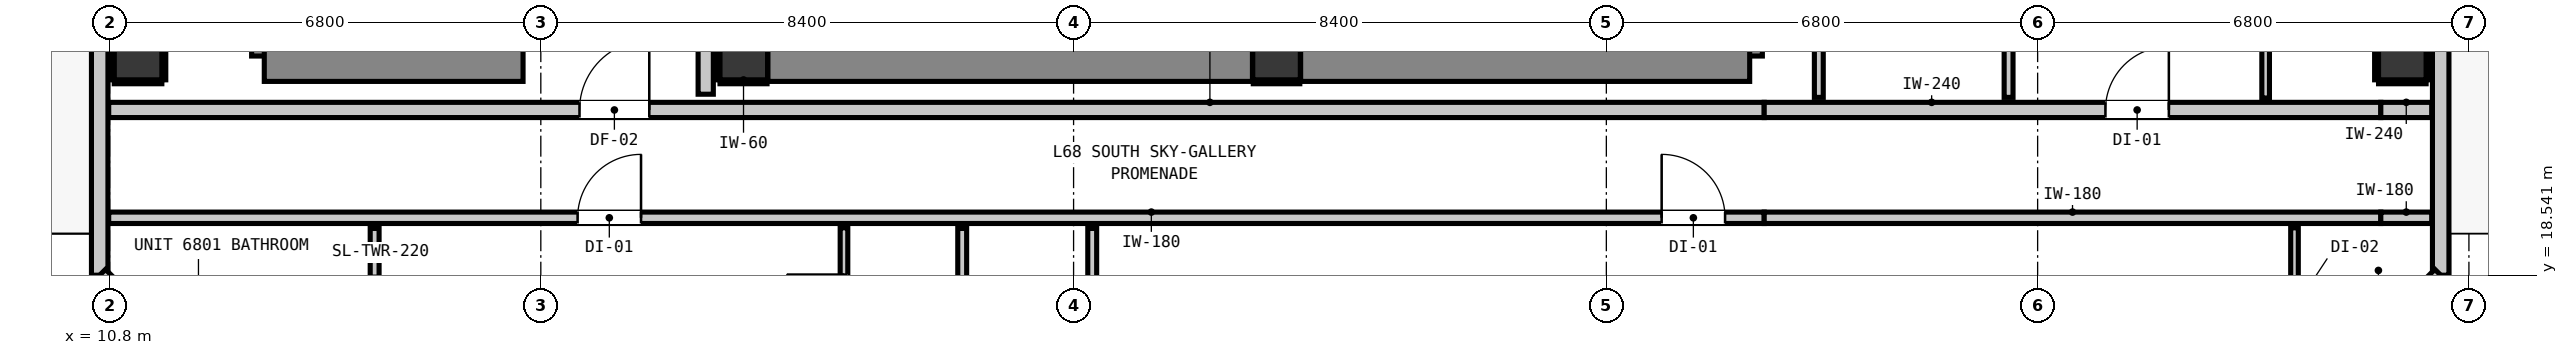
"""IFC4 building model, lengths in metres.
Left out: names, types, materials, properties, quantities, classifications, styles, units other than length and angle.
Written with IfcOpenShell. Run it as: python <this file> out.ifc"""

import sys

from ifc_helpers import new_model, si_unit, direction, frame, frame_2d, origin, origin_2d, place, context, subcontext, project, spatial, rectangle, extrude, element, fill, save


model = new_model("IFC4")
c1 = context("Model", 3, precision=1e-05, world=origin(), true_north=direction((0.0, 1.0)))
c2 = subcontext(c1, "Body", "Model", "MODEL_VIEW")
j1 = project(units=[si_unit("LENGTHUNIT", "METRE"), si_unit("PLANEANGLEUNIT", "RADIAN")], contexts=[c1])
p1 = place(None, origin())
s1 = spatial("IfcSite", under=j1, at=p1, CompositionType="ELEMENT")
p2 = place(p1, origin())
s2 = spatial("IfcBuilding", under=s1, at=p2, CompositionType="ELEMENT")
p3 = place(p2, frame((0.0, 0.0, 234.6)))
s3 = spatial("IfcBuildingStorey", under=s2, at=p3, CompositionType="ELEMENT", Elevation=234.6)
for number, where, z_axis, x_axis in (
    (1, (20.8, 22.0, 0.0), (0.0, 0.0, 1.0), (1.0, 0.0, 0.0)),
    (2, (29.2, 22.0, 0.0), (0.0, 0.0, 1.0), (1.0, 0.0, 0.0)),
):
    element("IfcColumn", number, at=place(p3, frame(where, z_axis=z_axis, x_axis=x_axis)), inside=s3, PredefinedType="COLUMN", context=c2, shape_type="SweptSolid", body=[
        extrude(rectangle(XDim=0.75, YDim=0.75, at=origin_2d()), origin(), (0.0, 0.0, 1.0), 3.32),
    ])
p4 = place(p3, frame((13.44, 22.0, 0.0), z_axis=(0.0, 0.0, 1.0), x_axis=(0.0, 1.0, 0.0)))
e3 = element("IfcWall", 3, at=p4, inside=s3, PredefinedType="SHEAR", context=c2, shape_type="SweptSolid", body=[
    extrude(rectangle(XDim=8.32, YDim=0.8, at=frame_2d((4.16, 0.0))), origin(), (0.0, 0.0, 1.0), 3.32),
])
p5 = place(p3, frame((13.24, 22.0, 0.0), z_axis=(0.0, 0.0, 1.0), x_axis=(1.0, 0.0, 0.0)))
e4 = element("IfcWall", 4, at=p5, inside=s3, PredefinedType="SHEAR", context=c2, shape_type="SweptSolid", body=[
    extrude(rectangle(XDim=4.08, YDim=0.8, at=frame_2d((2.04, 0.0))), origin(), (0.0, 0.0, 1.0), 3.32),
])
p6 = place(p3, frame((36.46, 22.0, 0.0), z_axis=(0.0, 0.0, 1.0), x_axis=(0.0, 1.0, 0.0)))
e5 = element("IfcWall", 5, at=p6, inside=s3, PredefinedType="SHEAR", context=c2, shape_type="SweptSolid", body=[
    extrude(rectangle(XDim=8.32, YDim=0.8, at=frame_2d((4.16, 0.0))), origin(), (0.0, 0.0, 1.0), 3.32),
])
p7 = place(p3, frame((29.58, 22.0, 0.0), z_axis=(0.0, 0.0, 1.0), x_axis=(1.0, 0.0, 0.0)))
e6 = element("IfcWall", 6, at=p7, inside=s3, PredefinedType="SHEAR", context=c2, shape_type="SweptSolid", body=[
    extrude(rectangle(XDim=7.08, YDim=0.8, at=frame_2d((3.54, 0.0))), origin(), (0.0, 0.0, 1.0), 3.32),
])
p8 = place(p3, frame((21.18, 22.0, 0.0), z_axis=(0.0, 0.0, 1.0), x_axis=(1.0, 0.0, 0.0)))
e7 = element("IfcWall", 7, at=p8, inside=s3, PredefinedType="SHEAR", context=c2, shape_type="SweptSolid", body=[
    extrude(rectangle(XDim=7.64, YDim=0.8, at=frame_2d((3.82, 0.0))), origin(), (0.0, 0.0, 1.0), 3.32),
])
for number, where, z_axis, x_axis in (
    (8, (11.25, 22.0, 0.0), (0.0, 0.0, 1.0), (1.0, 0.0, 0.0)),
    (9, (46.95, 22.0, 0.0), (0.0, 0.0, 1.0), (1.0, 0.0, 0.0)),
):
    element("IfcColumn", number, at=place(p3, frame(where, z_axis=z_axis, x_axis=x_axis)), inside=s3, PredefinedType="COLUMN", context=c2, shape_type="SweptSolid", body=[
        extrude(rectangle(XDim=0.75, YDim=0.75, at=origin_2d()), origin(), (0.0, 0.0, 1.0), 3.32),
    ])
p9 = place(p3, frame((10.645, 18.545, 0.0), z_axis=(0.0, 0.0, 1.0), x_axis=(0.0, 1.0, 0.0)))
e10 = element("IfcWall", 10, at=p9, inside=s3, PredefinedType="STANDARD", context=c2, shape_type="SweptSolid", body=[
    extrude(rectangle(XDim=30.31, YDim=0.26, at=frame_2d((15.155, 0.0))), origin(), (0.0, 0.0, 1.0), 3.1),
])
p10 = place(p9, frame((27.695, 0.0, 0.0)))
e11 = element("IfcOpeningElement", 11, at=p10, cuts=e10, PredefinedType="OPENING", context=c2, shape_type="SweptSolid", body=[
    extrude(rectangle(XDim=1.0, YDim=2.15, at=frame_2d((0.5, 1.075))), frame((0.0, 0.14, 0.0), z_axis=(0.0, -1.0, 0.0), x_axis=(1.0, 0.0, 0.0)), (0.0, 0.0, 1.0), 0.28),
])
p11 = place(p9, frame((29.108, 0.0, 0.85)))
e12 = element("IfcOpeningElement", 12, at=p11, cuts=e10, PredefinedType="OPENING", context=c2, shape_type="SweptSolid", body=[
    extrude(rectangle(XDim=0.9, YDim=1.5, at=frame_2d((0.45, 0.75))), frame((0.0, 0.14, 0.0), z_axis=(0.0, -1.0, 0.0), x_axis=(1.0, 0.0, 0.0)), (0.0, 0.0, 1.0), 0.28),
])
p12 = place(p3, frame((47.555, 48.855, 0.0), z_axis=(0.0, 0.0, 1.0), x_axis=(0.0, -1.0, 0.0)))
e13 = element("IfcWall", 13, at=p12, inside=s3, PredefinedType="STANDARD", context=c2, shape_type="SweptSolid", body=[
    extrude(rectangle(XDim=30.31, YDim=0.26, at=frame_2d((15.155, 0.0))), origin(), (0.0, 0.0, 1.0), 3.1),
])
p13 = place(p12, frame((0.91, 0.0, 0.0)))
e14 = element("IfcOpeningElement", 14, at=p13, cuts=e13, PredefinedType="OPENING", context=c2, shape_type="SweptSolid", body=[
    extrude(rectangle(XDim=1.0, YDim=2.15, at=frame_2d((0.5, 1.075))), frame((0.0, 0.14, 0.0), z_axis=(0.0, -1.0, 0.0), x_axis=(1.0, 0.0, 0.0)), (0.0, 0.0, 1.0), 0.28),
])
p14 = place(p12, frame((3.782, 0.0, 0.85)))
e15 = element("IfcOpeningElement", 15, at=p14, cuts=e13, PredefinedType="OPENING", context=c2, shape_type="SweptSolid", body=[
    extrude(rectangle(XDim=1.35, YDim=1.85, at=frame_2d((0.675, 0.925))), frame((0.0, 0.14, 0.0), z_axis=(0.0, -1.0, 0.0), x_axis=(1.0, 0.0, 0.0)), (0.0, 0.0, 1.0), 0.28),
])
for number, where, z_axis, x_axis in (
    (16, (47.555, 18.545, 0.0), (0.0, 0.0, 1.0), (-0.707, -0.707, 0.0)),
    (17, (12.745, 16.445, 0.0), (0.0, 0.0, 1.0), (-0.707, 0.707, 0.0)),
):
    element("IfcWall", number, at=place(p3, frame(where, z_axis=z_axis, x_axis=x_axis)), inside=s3, PredefinedType="STANDARD", context=c2, shape_type="SweptSolid", body=[
        extrude(rectangle(XDim=2.97, YDim=0.26, at=frame_2d((1.485, 0.0))), origin(), (0.0, 0.0, 1.0), 3.1),
    ])
p15 = place(p3, frame((10.787, 21.15, 0.0), z_axis=(0.0, 0.0, 1.0), x_axis=(1.0, 0.0, 0.0)))
e18 = element("IfcWall", 18, at=p15, inside=s3, PredefinedType="PARTITIONING", context=c2, shape_type="SweptSolid", body=[
    extrude(rectangle(XDim=26.102, YDim=0.24, at=frame_2d((13.051, 0.0))), origin(), (0.0, 0.0, 1.0), 3.1),
])
p16 = place(p15, frame((7.423, 0.0, 0.0)))
e19 = element("IfcOpeningElement", 19, at=p16, cuts=e18, PredefinedType="OPENING", context=c2, shape_type="SweptSolid", body=[
    extrude(rectangle(XDim=1.1, YDim=2.15, at=frame_2d((0.55, 1.075))), frame((0.0, 0.13, 0.0), z_axis=(0.0, -1.0, 0.0), x_axis=(1.0, 0.0, 0.0)), (0.0, 0.0, 1.0), 0.26),
])
p17 = place(p3, frame((36.889, 21.15, 0.0), z_axis=(0.0, 0.0, 1.0), x_axis=(1.0, 0.0, 0.0)))
e20 = element("IfcWall", 20, at=p17, inside=s3, PredefinedType="PARTITIONING", context=c2, shape_type="SweptSolid", body=[
    extrude(rectangle(XDim=9.722, YDim=0.24, at=frame_2d((4.861, 0.0))), origin(), (0.0, 0.0, 1.0), 2.477),
])
p18 = place(p17, frame((5.38, 0.0, 0.0)))
e21 = element("IfcOpeningElement", 21, at=p18, cuts=e20, PredefinedType="OPENING", context=c2, shape_type="SweptSolid", body=[
    extrude(rectangle(XDim=1.0, YDim=2.15, at=frame_2d((0.5, 1.075))), frame((0.0, 0.13, 0.0), z_axis=(0.0, -1.0, 0.0), x_axis=(1.0, 0.0, 0.0)), (0.0, 0.0, 1.0), 0.26),
])
p19 = place(p3, frame((46.611, 21.15, 0.0), z_axis=(0.0, 0.0, 1.0), x_axis=(1.0, 0.0, 0.0)))
e22 = element("IfcWall", 22, at=p19, inside=s3, PredefinedType="PARTITIONING", context=c2, shape_type="SweptSolid", body=[
    extrude(rectangle(XDim=0.802, YDim=0.24, at=frame_2d((0.401, 0.0))), origin(), (0.0, 0.0, 1.0), 3.1),
])
p20 = place(p3, frame((10.787, 19.45, 0.0), z_axis=(0.0, 0.0, 1.0), x_axis=(1.0, 0.0, 0.0)))
e23 = element("IfcWall", 23, at=p20, inside=s3, PredefinedType="PARTITIONING", context=c2, shape_type="SweptSolid", body=[
    extrude(rectangle(XDim=26.102, YDim=0.18, at=frame_2d((13.051, 0.0))), origin(), (0.0, 0.0, 1.0), 3.1),
])
p21 = place(p20, frame((7.393, 0.0, 0.0)))
e24 = element("IfcOpeningElement", 24, at=p21, cuts=e23, PredefinedType="OPENING", context=c2, shape_type="SweptSolid", body=[
    extrude(rectangle(XDim=1.0, YDim=2.15, at=frame_2d((0.5, 1.075))), frame((0.0, 0.1, 0.0), z_axis=(0.0, -1.0, 0.0), x_axis=(1.0, 0.0, 0.0)), (0.0, 0.0, 1.0), 0.2),
])
p22 = place(p20, frame((24.485, 0.0, 0.0)))
e25 = element("IfcOpeningElement", 25, at=p22, cuts=e23, PredefinedType="OPENING", context=c2, shape_type="SweptSolid", body=[
    extrude(rectangle(XDim=1.0, YDim=2.15, at=frame_2d((0.5, 1.075))), frame((0.0, 0.1, 0.0), z_axis=(0.0, -1.0, 0.0), x_axis=(1.0, 0.0, 0.0)), (0.0, 0.0, 1.0), 0.2),
])
p23 = place(p3, frame((36.889, 19.45, 0.0), z_axis=(0.0, 0.0, 1.0), x_axis=(1.0, 0.0, 0.0)))
e26 = element("IfcWall", 26, at=p23, inside=s3, PredefinedType="PARTITIONING", context=c2, shape_type="SweptSolid", body=[
    extrude(rectangle(XDim=9.722, YDim=0.18, at=frame_2d((4.861, 0.0))), origin(), (0.0, 0.0, 1.0), 2.477),
])
p24 = place(p3, frame((46.611, 19.45, 0.0), z_axis=(0.0, 0.0, 1.0), x_axis=(1.0, 0.0, 0.0)))
e27 = element("IfcWall", 27, at=p24, inside=s3, PredefinedType="PARTITIONING", context=c2, shape_type="SweptSolid", body=[
    extrude(rectangle(XDim=0.802, YDim=0.18, at=frame_2d((0.401, 0.0))), origin(), (0.0, 0.0, 1.0), 3.1),
])
p25 = place(p3, frame((20.2, 21.398, 0.0), z_axis=(0.0, 0.0, 1.0), x_axis=(0.0, 1.0, 0.0)))
e28 = element("IfcWall", 28, at=p25, inside=s3, PredefinedType="PARTITIONING", context=c2, shape_type="SweptSolid", body=[
    extrude(rectangle(XDim=6.754, YDim=0.24, at=frame_2d((3.377, 0.0))), origin(), (0.0, 0.0, 1.0), 3.1),
])
p26 = place(p3, frame((14.98, 16.587, 0.0), z_axis=(0.0, 0.0, 1.0), x_axis=(0.0, 1.0, 0.0)))
e29 = element("IfcWall", 29, at=p26, inside=s3, PredefinedType="PARTITIONING", context=c2, shape_type="SweptSolid", body=[
    extrude(rectangle(XDim=2.695, YDim=0.14, at=frame_2d((1.348, 0.0))), origin(), (0.0, 0.0, 1.0), 3.1),
])
p27 = place(p26, frame((1.088, 0.0, 0.0)))
e30 = element("IfcOpeningElement", 30, at=p27, cuts=e29, PredefinedType="OPENING", context=c2, shape_type="SweptSolid", body=[
    extrude(rectangle(XDim=0.86, YDim=2.02, at=frame_2d((0.43, 1.01))), frame((0.0, 0.08, 0.0), z_axis=(0.0, -1.0, 0.0), x_axis=(1.0, 0.0, 0.0)), (0.0, 0.0, 1.0), 0.16),
])
p28 = place(p3, frame((24.244, 16.587, 0.0), z_axis=(0.0, 0.0, 1.0), x_axis=(0.0, 1.0, 0.0)))
e31 = element("IfcWall", 31, at=p28, inside=s3, PredefinedType="PARTITIONING", context=c2, shape_type="SweptSolid", body=[
    extrude(rectangle(XDim=2.695, YDim=0.14, at=frame_2d((1.348, 0.0))), origin(), (0.0, 0.0, 1.0), 3.1),
])
p29 = place(p3, frame((26.294, 16.587, 0.0), z_axis=(0.0, 0.0, 1.0), x_axis=(0.0, 1.0, 0.0)))
e32 = element("IfcWall", 32, at=p29, inside=s3, PredefinedType="PARTITIONING", context=c2, shape_type="SweptSolid", body=[
    extrude(rectangle(XDim=2.695, YDim=0.14, at=frame_2d((1.348, 0.0))), origin(), (0.0, 0.0, 1.0), 3.1),
])
p30 = place(p29, frame((1.008, 0.0, 0.0)))
e33 = element("IfcOpeningElement", 33, at=p30, cuts=e32, PredefinedType="OPENING", context=c2, shape_type="SweptSolid", body=[
    extrude(rectangle(XDim=0.86, YDim=2.02, at=frame_2d((0.43, 1.01))), frame((0.0, 0.08, 0.0), z_axis=(0.0, -1.0, 0.0), x_axis=(1.0, 0.0, 0.0)), (0.0, 0.0, 1.0), 0.16),
])
p31 = place(p3, frame((37.75, 21.348, 0.0), z_axis=(0.0, 0.0, 1.0), x_axis=(0.0, 1.0, 0.0)))
e34 = element("IfcWall", 34, at=p31, inside=s3, PredefinedType="PARTITIONING", context=c2, shape_type="SweptSolid", body=[
    extrude(rectangle(XDim=4.004, YDim=0.14, at=frame_2d((2.002, 0.0))), origin(), (0.0, 0.0, 1.0), 3.1),
])
p32 = place(p3, frame((40.742, 21.348, 0.0), z_axis=(0.0, 0.0, 1.0), x_axis=(0.0, 1.0, 0.0)))
e35 = element("IfcWall", 35, at=p32, inside=s3, PredefinedType="PARTITIONING", context=c2, shape_type="SweptSolid", body=[
    extrude(rectangle(XDim=4.004, YDim=0.14, at=frame_2d((2.002, 0.0))), origin(), (0.0, 0.0, 1.0), 3.1),
])
p33 = place(p32, frame((1.56, 0.0, 0.0)))
e36 = element("IfcOpeningElement", 36, at=p33, cuts=e35, PredefinedType="OPENING", context=c2, shape_type="SweptSolid", body=[
    extrude(rectangle(XDim=0.86, YDim=2.02, at=frame_2d((0.43, 1.01))), frame((0.0, 0.08, 0.0), z_axis=(0.0, -1.0, 0.0), x_axis=(1.0, 0.0, 0.0)), (0.0, 0.0, 1.0), 0.16),
])
p34 = place(p3, frame((22.38, 16.587, 0.0), z_axis=(0.0, 0.0, 1.0), x_axis=(0.0, 1.0, 0.0)))
e37 = element("IfcWall", 37, at=p34, inside=s3, PredefinedType="PARTITIONING", context=c2, shape_type="SweptSolid", body=[
    extrude(rectangle(XDim=2.705, YDim=0.12, at=frame_2d((1.353, 0.0))), origin(), (0.0, 0.0, 1.0), 3.1),
])
p35 = place(p34, frame((1.068, 0.0, 0.0)))
e38 = element("IfcOpeningElement", 38, at=p35, cuts=e37, PredefinedType="OPENING", context=c2, shape_type="SweptSolid", body=[
    extrude(rectangle(XDim=0.9, YDim=2.1, at=frame_2d((0.45, 1.05))), frame((0.0, 0.07, 0.0), z_axis=(0.0, -1.0, 0.0), x_axis=(1.0, 0.0, 0.0)), (0.0, 0.0, 1.0), 0.14),
])
p36 = place(p3, frame((44.795, 21.338, 0.0), z_axis=(0.0, 0.0, 1.0), x_axis=(0.0, 1.0, 0.0)))
e39 = element("IfcWall", 39, at=p36, inside=s3, PredefinedType="PARTITIONING", context=c2, shape_type="SweptSolid", body=[
    extrude(rectangle(XDim=9.224, YDim=0.12, at=frame_2d((4.612, 0.0))), origin(), (0.0, 0.0, 1.0), 3.1),
])
p37 = place(p36, frame((4.137, 0.0, 0.0)))
e40 = element("IfcOpeningElement", 40, at=p37, cuts=e39, PredefinedType="OPENING", context=c2, shape_type="SweptSolid", body=[
    extrude(rectangle(XDim=0.9, YDim=2.1, at=frame_2d((0.45, 1.05))), frame((0.0, 0.07, 0.0), z_axis=(0.0, -1.0, 0.0), x_axis=(1.0, 0.0, 0.0)), (0.0, 0.0, 1.0), 0.14),
])
p38 = place(p3, frame((45.25, 16.587, 0.0), z_axis=(0.0, 0.0, 1.0), x_axis=(0.0, 1.0, 0.0)))
e41 = element("IfcWall", 41, at=p38, inside=s3, PredefinedType="PARTITIONING", context=c2, shape_type="SweptSolid", body=[
    extrude(rectangle(XDim=2.705, YDim=0.12, at=frame_2d((1.353, 0.0))), origin(), (0.0, 0.0, 1.0), 3.1),
])
p39 = place(p38, frame((0.988, 0.0, 0.0)))
e42 = element("IfcOpeningElement", 42, at=p39, cuts=e41, PredefinedType="OPENING", context=c2, shape_type="SweptSolid", body=[
    extrude(rectangle(XDim=0.9, YDim=2.1, at=frame_2d((0.45, 1.05))), frame((0.0, 0.07, 0.0), z_axis=(0.0, -1.0, 0.0), x_axis=(1.0, 0.0, 0.0)), (0.0, 0.0, 1.0), 0.14),
])
p40 = place(p3, frame((20.425, 21.593, 0.0), z_axis=(0.0, 0.0, 1.0), x_axis=(1.0, 0.0, 0.0)))
e43 = element("IfcWall", 43, at=p40, inside=s3, PredefinedType="PARTITIONING", context=c2, shape_type="SweptSolid", body=[
    extrude(rectangle(XDim=0.742, YDim=0.06, at=frame_2d((0.371, 0.0))), origin(), (0.0, 0.0, 1.0), 1.45),
])
p41 = place(p3, frame((20.393, 21.625, 0.0), z_axis=(0.0, 0.0, 1.0), x_axis=(0.0, 1.0, 0.0)))
e44 = element("IfcWall", 44, at=p41, inside=s3, PredefinedType="PARTITIONING", context=c2, shape_type="SweptSolid", body=[
    extrude(rectangle(XDim=0.75, YDim=0.06, at=frame_2d((0.375, 0.0))), origin(), (0.0, 0.0, 1.0), 1.45),
])
p42 = place(p3, frame((28.833, 21.593, 0.0), z_axis=(0.0, 0.0, 1.0), x_axis=(1.0, 0.0, 0.0)))
e45 = element("IfcWall", 45, at=p42, inside=s3, PredefinedType="PARTITIONING", context=c2, shape_type="SweptSolid", body=[
    extrude(rectangle(XDim=0.734, YDim=0.06, at=frame_2d((0.367, 0.0))), origin(), (0.0, 0.0, 1.0), 1.45),
])
for number, where, z_axis, x_axis in (
    (46, (10.875, 21.593, 0.0), (0.0, 0.0, 1.0), (1.0, 0.0, 0.0)),
    (47, (10.843, 21.625, 0.0), (0.0, 0.0, 1.0), (0.0, 1.0, 0.0)),
    (48, (11.657, 21.625, 0.0), (0.0, 0.0, 1.0), (0.0, 1.0, 0.0)),
    (49, (46.575, 21.593, 0.0), (0.0, 0.0, 1.0), (1.0, 0.0, 0.0)),
    (50, (46.543, 21.625, 0.0), (0.0, 0.0, 1.0), (0.0, 1.0, 0.0)),
    (51, (47.357, 21.625, 0.0), (0.0, 0.0, 1.0), (0.0, 1.0, 0.0)),
):
    element("IfcWall", number, at=place(p3, frame(where, z_axis=z_axis, x_axis=x_axis)), inside=s3, PredefinedType="PARTITIONING", context=c2, shape_type="SweptSolid", body=[
        extrude(rectangle(XDim=0.75, YDim=0.06, at=frame_2d((0.375, 0.0))), origin(), (0.0, 0.0, 1.0), 1.45),
    ])
p43 = place(p16, origin())
e52 = element("IfcDoor", 52, at=p43, inside=s3, OperationType="SINGLE_SWING_RIGHT", PredefinedType="DOOR", context=c2, shape_type="SweptSolid", body=[
    extrude(rectangle(XDim=1.1, YDim=2.15, at=frame_2d((0.55, 1.075))), frame((0.0, 0.025, 0.0), z_axis=(0.0, -1.0, 0.0), x_axis=(1.0, 0.0, 0.0)), (0.0, 0.0, 1.0), 0.05),
])
fill(e19, e52)
p44 = place(p21, origin())
e53 = element("IfcDoor", 53, at=p44, inside=s3, OperationType="SINGLE_SWING_RIGHT", PredefinedType="DOOR", context=c2, shape_type="SweptSolid", body=[
    extrude(rectangle(XDim=1.0, YDim=2.15, at=frame_2d((0.5, 1.075))), frame((0.0, 0.025, 0.0), z_axis=(0.0, -1.0, 0.0), x_axis=(1.0, 0.0, 0.0)), (0.0, 0.0, 1.0), 0.05),
])
fill(e24, e53)
p45 = place(p35, origin())
e54 = element("IfcDoor", 54, at=p45, inside=s3, OperationType="SINGLE_SWING_RIGHT", PredefinedType="DOOR", context=c2, shape_type="SweptSolid", body=[
    extrude(rectangle(XDim=0.9, YDim=2.1, at=frame_2d((0.45, 1.05))), frame((0.0, 0.025, 0.0), z_axis=(0.0, -1.0, 0.0), x_axis=(1.0, 0.0, 0.0)), (0.0, 0.0, 1.0), 0.05),
])
fill(e38, e54)
p46 = place(p22, origin())
e55 = element("IfcDoor", 55, at=p46, inside=s3, OperationType="SINGLE_SWING_LEFT", PredefinedType="DOOR", context=c2, shape_type="SweptSolid", body=[
    extrude(rectangle(XDim=1.0, YDim=2.15, at=frame_2d((0.5, 1.075))), frame((0.0, 0.025, 0.0), z_axis=(0.0, -1.0, 0.0), x_axis=(1.0, 0.0, 0.0)), (0.0, 0.0, 1.0), 0.05),
])
fill(e25, e55)
p47 = place(p18, origin())
e56 = element("IfcDoor", 56, at=p47, inside=s3, OperationType="SINGLE_SWING_RIGHT", PredefinedType="DOOR", context=c2, shape_type="SweptSolid", body=[
    extrude(rectangle(XDim=1.0, YDim=2.15, at=frame_2d((0.5, 1.075))), frame((0.0, 0.025, 0.0), z_axis=(0.0, -1.0, 0.0), x_axis=(1.0, 0.0, 0.0)), (0.0, 0.0, 1.0), 0.05),
])
fill(e21, e56)
save(model, sys.argv[1])
